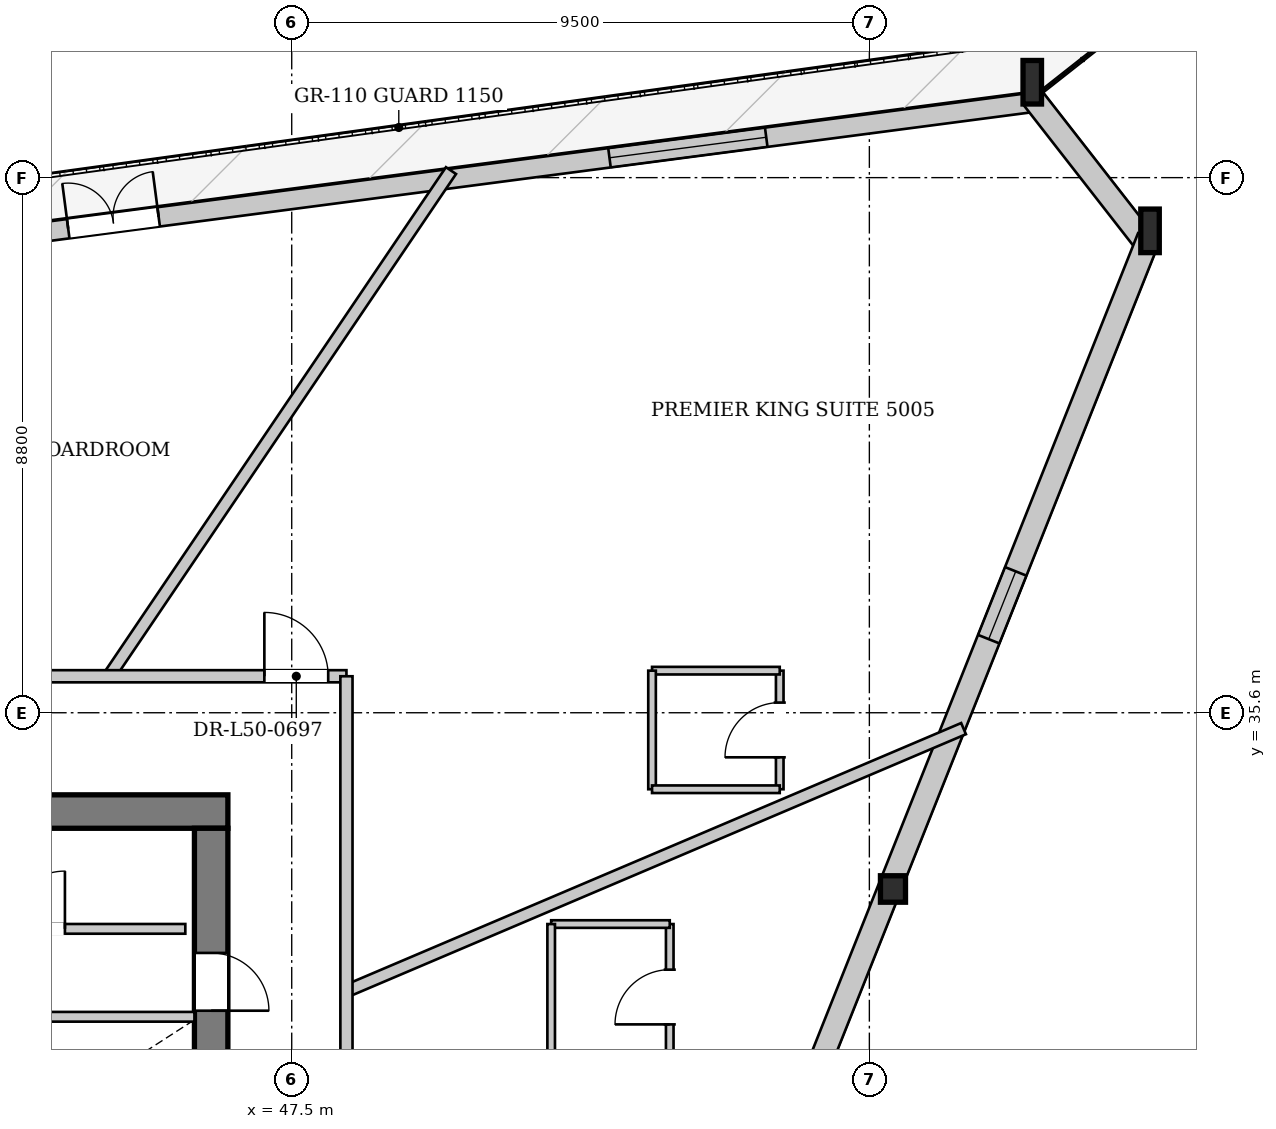
"""IFC4 building model, lengths in metres.
Left out: names, types, materials, properties, quantities, classifications, styles, units other than length and angle.
Written with IfcOpenShell. Run it as: python <this file> out.ifc"""

import sys

from ifc_helpers import new_model, si_unit, direction, frame, frame_2d, origin, origin_2d, place, context, subcontext, project, spatial, rectangle, i_section, extrude, source, transform, mapped, element, fill, save


model = new_model("IFC4")
c1 = context("Model", 3, precision=1e-05, world=origin(), true_north=direction((0.0, 1.0)))
c2 = subcontext(c1, "Body", "Model", "MODEL_VIEW")
j1 = project(units=[si_unit("LENGTHUNIT", "METRE"), si_unit("PLANEANGLEUNIT", "RADIAN")], contexts=[c1])
p1 = place(None, origin())
s1 = spatial("IfcSite", under=j1, at=p1, CompositionType="ELEMENT")
p2 = place(p1, origin())
s2 = spatial("IfcBuilding", under=s1, at=p2, CompositionType="ELEMENT")
p3 = place(p2, frame((0.0, 0.0, 189.2)))
s3 = spatial("IfcBuildingStorey", under=s2, at=p3, CompositionType="ELEMENT", Elevation=189.2)
m1 = source(origin(), c2, "Body", "SweptSolid", [
    extrude(i_section(OverallWidth=0.304, OverallDepth=0.716, WebThickness=0.021, FlangeThickness=0.04, at=origin_2d()), origin(), (0.0, 0.0, 1.0), 3.418),
])
p4 = place(p3, frame((61.772, 43.346, 0.0), z_axis=(-0.091350364073, 0.10484936236, 0.990283657442), x_axis=(-0.75397491374, -0.656903211631, 0.0)))
e1 = element("IfcColumn", 1, at=p4, inside=s3, PredefinedType="COLUMN", context=c2, shape_type="MappedRepresentation", body=[
    mapped(m1, transform((0.0, 0.0, 0.0), x_axis=(1.0, 0.0, 0.0), y_axis=(0.0, 1.0, 0.0), z_axis=(0.0, 0.0, 1.0), scale=1.0)),
])
m2 = source(origin(), c2, "Body", "SweptSolid", [
    extrude(i_section(OverallWidth=0.304, OverallDepth=0.716, WebThickness=0.021, FlangeThickness=0.04, at=origin_2d()), origin(), (0.0, 0.0, 1.0), 3.414),
])
p5 = place(p3, frame((59.843, 45.82, 0.0), z_axis=(-0.095689436371, 0.087250457677, 0.991579996471), x_axis=(-0.673771596973, -0.738939669467, 0.0)))
e2 = element("IfcColumn", 2, at=p5, inside=s3, PredefinedType="COLUMN", context=c2, shape_type="MappedRepresentation", body=[
    mapped(m2, transform((0.0, 0.0, 0.0), x_axis=(1.0, 0.0, 0.0), y_axis=(0.0, 1.0, 0.0), z_axis=(0.0, 0.0, 1.0), scale=1.0)),
])
m3 = source(origin(), c2, "Body", "SweptSolid", [
    extrude(i_section(OverallWidth=0.412, OverallDepth=0.435, WebThickness=0.031, FlangeThickness=0.05, at=origin_2d()), origin(), (0.0, 0.0, 1.0), 3.403),
])
p6 = place(p3, frame((57.468, 32.544, 0.0), z_axis=(-0.046628569909, 0.092468040943, 0.994623264293), x_axis=(-0.892898044648, -0.450258905369, 0.0)))
e3 = element("IfcColumn", 3, at=p6, inside=s3, PredefinedType="COLUMN", context=c2, shape_type="MappedRepresentation", body=[
    mapped(m3, transform((0.0, 0.0, 0.0), x_axis=(1.0, 0.0, 0.0), y_axis=(0.0, 1.0, 0.0), z_axis=(0.0, 0.0, 1.0), scale=1.0)),
])
p7 = place(p3, frame((37.37, 42.715, 0.0), z_axis=(0.0, 0.0, 1.0), x_axis=(0.991528786197, 0.129887128474, 0.0)))
e4 = element("IfcWall", 4, at=p7, inside=s3, PredefinedType="SOLIDWALL", context=c2, shape_type="SweptSolid", body=[
    extrude(rectangle(XDim=22.685, YDim=0.32, at=frame_2d((11.343, 0.0))), origin(), (0.0, 0.0, 1.0), 2.722),
])
p8 = place(p7, frame((6.509, 0.0, 0.0)))
e5 = element("IfcOpeningElement", 5, at=p8, cuts=e4, PredefinedType="OPENING", context=c2, shape_type="SweptSolid", body=[
    extrude(rectangle(XDim=1.5, YDim=2.3, at=frame_2d((0.75, 1.15))), frame((0.0, 0.17, 0.0), z_axis=(0.0, -1.0, 0.0), x_axis=(1.0, 0.0, 0.0)), (0.0, 0.0, 1.0), 0.34),
])
p9 = place(p7, frame((15.487, 0.0, 0.252)))
e6 = element("IfcOpeningElement", 6, at=p9, cuts=e4, PredefinedType="OPENING", context=c2, shape_type="SweptSolid", body=[
    extrude(rectangle(XDim=2.6, YDim=2.35, at=frame_2d((1.3, 1.175))), frame((0.0, 0.17, 0.0), z_axis=(0.0, -1.0, 0.0), x_axis=(1.0, 0.0, 0.0)), (0.0, 0.0, 1.0), 0.34),
])
p10 = place(p3, frame((59.693, 45.703, 0.0), z_axis=(0.0, 0.0, 1.0), x_axis=(0.615044377404, -0.788492494463, 0.0)))
e7 = element("IfcWall", 7, at=p10, inside=s3, PredefinedType="SOLIDWALL", context=c2, shape_type="SweptSolid", body=[
    extrude(rectangle(XDim=3.137, YDim=0.38, at=frame_2d((1.569, 0.0))), origin(), (0.0, 0.0, 1.0), 2.722),
])
p11 = place(p3, frame((61.596, 43.416, 0.0), z_axis=(0.0, 0.0, 1.0), x_axis=(-0.370190270335, -0.928955953611, 0.0)))
e8 = element("IfcWall", 8, at=p11, inside=s3, PredefinedType="SOLIDWALL", context=c2, shape_type="SweptSolid", body=[
    extrude(rectangle(XDim=23.255, YDim=0.38, at=frame_2d((11.627, 0.0))), origin(), (0.0, 0.0, 1.0), 2.722),
])
p12 = place(p11, frame((5.911, 0.0, 0.65)))
e9 = element("IfcOpeningElement", 9, at=p12, cuts=e8, PredefinedType="OPENING", context=c2, shape_type="SweptSolid", body=[
    extrude(rectangle(XDim=1.2, YDim=1.5, at=frame_2d((0.6, 0.75))), frame((0.0, 0.2, 0.0), z_axis=(0.0, -1.0, 0.0), x_axis=(1.0, 0.0, 0.0)), (0.0, 0.0, 1.0), 0.4),
])
p13 = place(p11, frame((16.143, 0.0, 0.65)))
e10 = element("IfcOpeningElement", 10, at=p13, cuts=e8, PredefinedType="OPENING", context=c2, shape_type="SweptSolid", body=[
    extrude(rectangle(XDim=1.2, YDim=1.5, at=frame_2d((0.6, 0.75))), frame((0.0, 0.2, 0.0), z_axis=(0.0, -1.0, 0.0), x_axis=(1.0, 0.0, 0.0)), (0.0, 0.0, 1.0), 0.4),
])
p14 = place(p3, frame((29.55, 33.975, 0.0), z_axis=(0.0, 0.0, 1.0), x_axis=(1.0, 0.0, 0.0)))
e11 = element("IfcWall", 11, at=p14, inside=s3, PredefinedType="SHEAR", context=c2, shape_type="SweptSolid", body=[
    extrude(rectangle(XDim=16.9, YDim=0.55, at=frame_2d((8.45, 0.0))), origin(), (0.0, 0.0, 1.0), 3.33),
])
p15 = place(p14, frame((1.55, 0.0, 0.0)))
e12 = element("IfcOpeningElement", 12, at=p15, cuts=e11, PredefinedType="OPENING", context=c2, shape_type="SweptSolid", body=[
    extrude(rectangle(XDim=0.95, YDim=2.1, at=frame_2d((0.475, 1.05))), frame((0.0, 0.285, 0.0), z_axis=(0.0, -1.0, 0.0), x_axis=(1.0, 0.0, 0.0)), (0.0, 0.0, 1.0), 0.57),
])
p16 = place(p14, frame((3.93, 0.0, 0.0)))
e13 = element("IfcOpeningElement", 13, at=p16, cuts=e11, PredefinedType="OPENING", context=c2, shape_type="SweptSolid", body=[
    extrude(rectangle(XDim=1.32, YDim=2.2, at=frame_2d((0.66, 1.1))), frame((0.0, 0.285, 0.0), z_axis=(0.0, -1.0, 0.0), x_axis=(1.0, 0.0, 0.0)), (0.0, 0.0, 1.0), 0.57),
])
p17 = place(p3, frame((46.175, 33.7, 0.0), z_axis=(0.0, 0.0, 1.0), x_axis=(0.0, -1.0, 0.0)))
e14 = element("IfcWall", 14, at=p17, inside=s3, PredefinedType="SHEAR", context=c2, shape_type="SweptSolid", body=[
    extrude(rectangle(XDim=14.2, YDim=0.55, at=frame_2d((7.1, 0.0))), origin(), (0.0, 0.0, 1.0), 3.33),
])
p18 = place(p17, frame((5.18, 0.0, 0.0)))
e15 = element("IfcOpeningElement", 15, at=p18, cuts=e14, PredefinedType="OPENING", context=c2, shape_type="SweptSolid", body=[
    extrude(rectangle(XDim=1.6, YDim=2.2, at=frame_2d((0.8, 1.1))), frame((0.0, 0.285, 0.0), z_axis=(0.0, -1.0, 0.0), x_axis=(1.0, 0.0, 0.0)), (0.0, 0.0, 1.0), 0.57),
])
p19 = place(p17, frame((2.05, 0.0, 0.0)))
e16 = element("IfcOpeningElement", 16, at=p19, cuts=e14, PredefinedType="OPENING", context=c2, shape_type="SweptSolid", body=[
    extrude(rectangle(XDim=0.95, YDim=2.1, at=frame_2d((0.475, 1.05))), frame((0.0, 0.285, 0.0), z_axis=(0.0, -1.0, 0.0), x_axis=(1.0, 0.0, 0.0)), (0.0, 0.0, 1.0), 0.57),
])
p20 = place(p3, frame((40.72, 30.6, 0.0), z_axis=(0.0, 0.0, 1.0), x_axis=(1.0, 0.0, 0.0)))
e17 = element("IfcWall", 17, at=p20, inside=s3, PredefinedType="PARTITIONING", context=c2, shape_type="SweptSolid", body=[
    extrude(rectangle(XDim=5.18, YDim=0.16, at=frame_2d((2.59, 0.0))), origin(), (0.0, 0.0, 1.0), 3.33),
])
p21 = place(p3, frame((40.72, 32.046, 0.0), z_axis=(0.0, 0.0, 1.0), x_axis=(1.0, 0.0, 0.0)))
e18 = element("IfcWall", 18, at=p21, inside=s3, PredefinedType="PARTITIONING", context=c2, shape_type="SweptSolid", body=[
    extrude(rectangle(XDim=5.03, YDim=0.16, at=frame_2d((2.515, 0.0))), origin(), (0.0, 0.0, 1.0), 3.33),
])
p22 = place(p21, frame((2.1, 0.0, 0.0)))
e19 = element("IfcOpeningElement", 19, at=p22, cuts=e18, PredefinedType="OPENING", context=c2, shape_type="SweptSolid", body=[
    extrude(rectangle(XDim=0.95, YDim=2.1, at=frame_2d((0.475, 1.05))), frame((0.0, 0.09, 0.0), z_axis=(0.0, -1.0, 0.0), x_axis=(1.0, 0.0, 0.0)), (0.0, 0.0, 1.0), 0.18),
])
p23 = place(p3, frame((48.4, 31.023, 0.0), z_axis=(0.0, 0.0, 1.0), x_axis=(0.920240648348, 0.391352972556, 0.0)))
e20 = element("IfcWall", 20, at=p23, inside=s3, PredefinedType="PARTITIONING", context=c2, shape_type="SweptSolid", body=[
    extrude(rectangle(XDim=11.029, YDim=0.2, at=frame_2d((5.514, 0.0))), origin(), (0.0, 0.0, 1.0), 3.33),
])
p24 = place(p3, frame((44.494, 36.2, 0.0), z_axis=(0.0, 0.0, 1.0), x_axis=(0.560293666023, 0.828294034637, 0.0)))
e21 = element("IfcWall", 21, at=p24, inside=s3, PredefinedType="PARTITIONING", context=c2, shape_type="SweptSolid", body=[
    extrude(rectangle(XDim=10.04, YDim=0.2, at=frame_2d((5.02, 0.0))), origin(), (0.0, 0.0, 1.0), 3.33),
])
p25 = place(p3, frame((53.717, 29.725, 0.0), z_axis=(0.0, 0.0, 1.0), x_axis=(0.0, 1.0, 0.0)))
e22 = element("IfcWall", 22, at=p25, inside=s3, PredefinedType="PARTITIONING", context=c2, shape_type="SweptSolid", body=[
    extrude(rectangle(XDim=2.4, YDim=0.125, at=frame_2d((1.2, 0.0))), origin(), (0.0, 0.0, 1.0), 3.33),
])
p26 = place(p25, frame((0.75, 0.0, 0.0)))
e23 = element("IfcOpeningElement", 23, at=p26, cuts=e22, PredefinedType="OPENING", context=c2, shape_type="SweptSolid", body=[
    extrude(rectangle(XDim=0.9, YDim=2.1, at=frame_2d((0.45, 1.05))), frame((0.0, 0.073, 0.0), z_axis=(0.0, -1.0, 0.0), x_axis=(1.0, 0.0, 0.0)), (0.0, 0.0, 1.0), 0.145),
])
p27 = place(p3, frame((53.717, 32.125, 0.0), z_axis=(0.0, 0.0, 1.0), x_axis=(-1.0, 0.0, 0.0)))
e24 = element("IfcWall", 24, at=p27, inside=s3, PredefinedType="PARTITIONING", context=c2, shape_type="SweptSolid", body=[
    extrude(rectangle(XDim=1.95, YDim=0.125, at=frame_2d((0.975, 0.0))), origin(), (0.0, 0.0, 1.0), 3.33),
])
p28 = place(p3, frame((51.767, 32.125, 0.0), z_axis=(0.0, 0.0, 1.0), x_axis=(0.0, -1.0, 0.0)))
e25 = element("IfcWall", 25, at=p28, inside=s3, PredefinedType="PARTITIONING", context=c2, shape_type="SweptSolid", body=[
    extrude(rectangle(XDim=2.4, YDim=0.125, at=frame_2d((1.2, 0.0))), origin(), (0.0, 0.0, 1.0), 3.33),
])
p29 = place(p3, frame((55.526, 34.342, 0.0), z_axis=(0.0, 0.0, 1.0), x_axis=(0.0, 1.0, 0.0)))
e26 = element("IfcWall", 26, at=p29, inside=s3, PredefinedType="PARTITIONING", context=c2, shape_type="SweptSolid", body=[
    extrude(rectangle(XDim=1.95, YDim=0.125, at=frame_2d((0.975, 0.0))), origin(), (0.0, 0.0, 1.0), 3.33),
])
p30 = place(p29, frame((0.525, 0.0, 0.0)))
e27 = element("IfcOpeningElement", 27, at=p30, cuts=e26, PredefinedType="OPENING", context=c2, shape_type="SweptSolid", body=[
    extrude(rectangle(XDim=0.9, YDim=2.1, at=frame_2d((0.45, 1.05))), frame((0.0, 0.073, 0.0), z_axis=(0.0, -1.0, 0.0), x_axis=(1.0, 0.0, 0.0)), (0.0, 0.0, 1.0), 0.145),
])
p31 = place(p3, frame((55.526, 36.292, 0.0), z_axis=(0.0, 0.0, 1.0), x_axis=(-1.0, 0.0, 0.0)))
e28 = element("IfcWall", 28, at=p31, inside=s3, PredefinedType="PARTITIONING", context=c2, shape_type="SweptSolid", body=[
    extrude(rectangle(XDim=2.1, YDim=0.125, at=frame_2d((1.05, 0.0))), origin(), (0.0, 0.0, 1.0), 3.33),
])
p32 = place(p3, frame((53.426, 36.292, 0.0), z_axis=(0.0, 0.0, 1.0), x_axis=(0.0, -1.0, 0.0)))
e29 = element("IfcWall", 29, at=p32, inside=s3, PredefinedType="PARTITIONING", context=c2, shape_type="SweptSolid", body=[
    extrude(rectangle(XDim=1.95, YDim=0.125, at=frame_2d((0.975, 0.0))), origin(), (0.0, 0.0, 1.0), 3.33),
])
p33 = place(p3, frame((53.426, 34.342, 0.0), z_axis=(0.0, 0.0, 1.0), x_axis=(1.0, 0.0, 0.0)))
e30 = element("IfcWall", 30, at=p33, inside=s3, PredefinedType="PARTITIONING", context=c2, shape_type="SweptSolid", body=[
    extrude(rectangle(XDim=2.1, YDim=0.125, at=frame_2d((1.05, 0.0))), origin(), (0.0, 0.0, 1.0), 3.33),
])
p34 = place(p3, frame((43.4, 36.2, 0.0), z_axis=(0.0, 0.0, 1.0), x_axis=(1.0, 0.0, 0.0)))
e31 = element("IfcWall", 31, at=p34, inside=s3, PredefinedType="PARTITIONING", context=c2, shape_type="SweptSolid", body=[
    extrude(rectangle(XDim=5.0, YDim=0.2, at=frame_2d((2.5, 0.0))), origin(), (0.0, 0.0, 1.0), 3.33),
])
p35 = place(p34, frame((3.65, 0.0, 0.0)))
e32 = element("IfcOpeningElement", 32, at=p35, cuts=e31, PredefinedType="OPENING", context=c2, shape_type="SweptSolid", body=[
    extrude(rectangle(XDim=1.05, YDim=2.2, at=frame_2d((0.525, 1.1))), frame((0.0, 0.11, 0.0), z_axis=(0.0, -1.0, 0.0), x_axis=(1.0, 0.0, 0.0)), (0.0, 0.0, 1.0), 0.22),
])
p36 = place(p3, frame((48.4, 17.0, 0.0), z_axis=(0.0, 0.0, 1.0), x_axis=(0.0, 1.0, 0.0)))
e33 = element("IfcWall", 33, at=p36, inside=s3, PredefinedType="PARTITIONING", context=c2, shape_type="SweptSolid", body=[
    extrude(rectangle(XDim=19.2, YDim=0.2, at=frame_2d((9.6, 0.0))), origin(), (0.0, 0.0, 1.0), 3.33),
])
p37 = place(p36, frame((1.632, 0.0, 0.0)))
e34 = element("IfcOpeningElement", 34, at=p37, cuts=e33, PredefinedType="OPENING", context=c2, shape_type="SweptSolid", body=[
    extrude(rectangle(XDim=1.05, YDim=2.2, at=frame_2d((0.525, 1.1))), frame((0.0, 0.11, 0.0), z_axis=(0.0, -1.0, 0.0), x_axis=(1.0, 0.0, 0.0)), (0.0, 0.0, 1.0), 0.22),
])
p38 = place(p36, frame((9.686, 0.0, 0.0)))
e35 = element("IfcOpeningElement", 35, at=p38, cuts=e33, PredefinedType="OPENING", context=c2, shape_type="SweptSolid", body=[
    extrude(rectangle(XDim=1.05, YDim=2.2, at=frame_2d((0.525, 1.1))), frame((0.0, 0.11, 0.0), z_axis=(0.0, -1.0, 0.0), x_axis=(1.0, 0.0, 0.0)), (0.0, 0.0, 1.0), 0.22),
])
m4 = source(origin(), c2, "Body", "SweptSolid", [
    extrude(rectangle(XDim=1.5, YDim=2.3, at=frame_2d((0.75, 1.15))), frame((0.0, 0.025, 0.0), z_axis=(0.0, -1.0, 0.0), x_axis=(1.0, 0.0, 0.0)), (0.0, 0.0, 1.0), 0.05),
])
p39 = place(p8, origin())
e36 = element("IfcDoor", 36, at=p39, inside=s3, OperationType="DOUBLE_DOOR_SINGLE_SWING", PredefinedType="DOOR", context=c2, shape_type="MappedRepresentation", body=[
    mapped(m4, transform((0.0, 0.0, 0.0), x_axis=(1.0, 0.0, 0.0), y_axis=(0.0, 1.0, 0.0), z_axis=(0.0, 0.0, 1.0), scale=1.0)),
])
fill(e5, e36)
m5 = source(origin(), c2, "Body", "SweptSolid", [
    extrude(rectangle(XDim=2.6, YDim=2.35, at=frame_2d((1.3, 1.175))), frame((0.0, 0.03, 0.0), z_axis=(0.0, -1.0, 0.0), x_axis=(1.0, 0.0, 0.0)), (0.0, 0.0, 1.0), 0.06),
])
p40 = place(p9, origin())
e37 = element("IfcWindow", 37, at=p40, inside=s3, PartitioningType="SINGLE_PANEL", PredefinedType="WINDOW", context=c2, shape_type="MappedRepresentation", body=[
    mapped(m5, transform((0.0, 0.0, 0.0), x_axis=(1.0, 0.0, 0.0), y_axis=(0.0, 1.0, 0.0), z_axis=(0.0, 0.0, 1.0), scale=1.0)),
])
fill(e6, e37)
m6 = source(origin(), c2, "Body", "SweptSolid", [
    extrude(rectangle(XDim=1.2, YDim=1.5, at=frame_2d((0.6, 0.75))), frame((0.0, 0.03, 0.0), z_axis=(0.0, -1.0, 0.0), x_axis=(1.0, 0.0, 0.0)), (0.0, 0.0, 1.0), 0.06),
])
p41 = place(p12, origin())
e38 = element("IfcWindow", 38, at=p41, inside=s3, PartitioningType="SINGLE_PANEL", PredefinedType="WINDOW", context=c2, shape_type="MappedRepresentation", body=[
    mapped(m6, transform((0.0, 0.0, 0.0), x_axis=(1.0, 0.0, 0.0), y_axis=(0.0, 1.0, 0.0), z_axis=(0.0, 0.0, 1.0), scale=1.0)),
])
fill(e9, e38)
m7 = source(origin(), c2, "Body", "SweptSolid", [
    extrude(rectangle(XDim=0.95, YDim=2.1, at=frame_2d((0.475, 1.05))), frame((0.0, 0.025, 0.0), z_axis=(0.0, -1.0, 0.0), x_axis=(1.0, 0.0, 0.0)), (0.0, 0.0, 1.0), 0.05),
])
p42 = place(p22, origin())
e39 = element("IfcDoor", 39, at=p42, inside=s3, OperationType="SINGLE_SWING_RIGHT", PredefinedType="DOOR", context=c2, shape_type="MappedRepresentation", body=[
    mapped(m7, transform((0.0, 0.0, 0.0), x_axis=(1.0, 0.0, 0.0), y_axis=(0.0, 1.0, 0.0), z_axis=(0.0, 0.0, 1.0), scale=1.0)),
])
fill(e19, e39)
p43 = place(p19, origin())
e40 = element("IfcDoor", 40, at=p43, inside=s3, OperationType="SINGLE_SWING_RIGHT", PredefinedType="DOOR", context=c2, shape_type="MappedRepresentation", body=[
    mapped(m7, transform((0.0, 0.0, 0.0), x_axis=(1.0, 0.0, 0.0), y_axis=(0.0, 1.0, 0.0), z_axis=(0.0, 0.0, 1.0), scale=1.0)),
])
fill(e16, e40)
m8 = source(origin(), c2, "Body", "SweptSolid", [
    extrude(rectangle(XDim=0.9, YDim=2.1, at=frame_2d((0.45, 1.05))), frame((0.0, 0.025, 0.0), z_axis=(0.0, -1.0, 0.0), x_axis=(1.0, 0.0, 0.0)), (0.0, 0.0, 1.0), 0.05),
])
p44 = place(p26, origin())
e41 = element("IfcDoor", 41, at=p44, inside=s3, OperationType="SINGLE_SWING_LEFT", PredefinedType="DOOR", context=c2, shape_type="MappedRepresentation", body=[
    mapped(m8, transform((0.0, 0.0, 0.0), x_axis=(1.0, 0.0, 0.0), y_axis=(0.0, 1.0, 0.0), z_axis=(0.0, 0.0, 1.0), scale=1.0)),
])
fill(e23, e41)
p45 = place(p30, origin())
e42 = element("IfcDoor", 42, at=p45, inside=s3, OperationType="SINGLE_SWING_LEFT", PredefinedType="DOOR", context=c2, shape_type="MappedRepresentation", body=[
    mapped(m8, transform((0.0, 0.0, 0.0), x_axis=(1.0, 0.0, 0.0), y_axis=(0.0, 1.0, 0.0), z_axis=(0.0, 0.0, 1.0), scale=1.0)),
])
fill(e27, e42)
m9 = source(origin(), c2, "Body", "SweptSolid", [
    extrude(rectangle(XDim=1.05, YDim=2.2, at=frame_2d((0.525, 1.1))), frame((0.0, 0.025, 0.0), z_axis=(0.0, -1.0, 0.0), x_axis=(1.0, 0.0, 0.0)), (0.0, 0.0, 1.0), 0.05),
])
p46 = place(p35, origin())
e43 = element("IfcDoor", 43, at=p46, inside=s3, OperationType="SINGLE_SWING_LEFT", PredefinedType="DOOR", context=c2, shape_type="MappedRepresentation", body=[
    mapped(m9, transform((0.0, 0.0, 0.0), x_axis=(1.0, 0.0, 0.0), y_axis=(0.0, 1.0, 0.0), z_axis=(0.0, 0.0, 1.0), scale=1.0)),
])
fill(e32, e43)
save(model, sys.argv[1])
